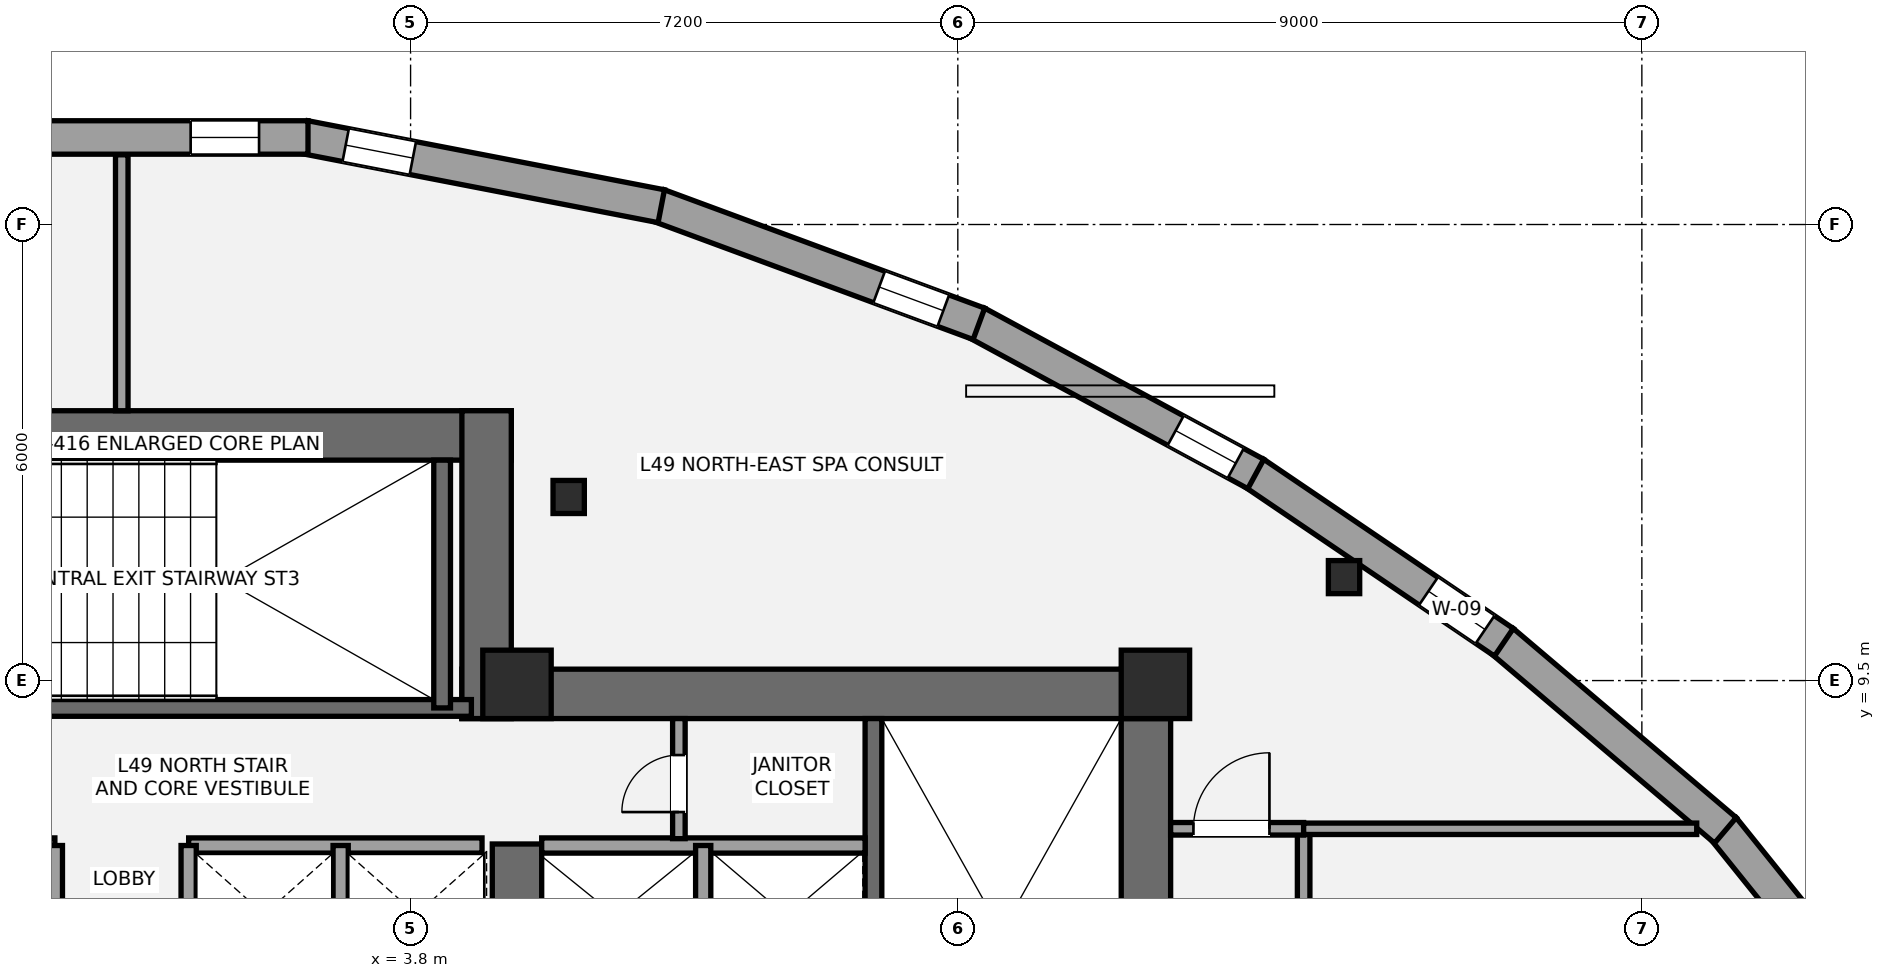
"""IFC4 building model, lengths in metres.
Left out: names, types, materials, properties, quantities, classifications, styles, units other than length and angle.
Written with IfcOpenShell. Run it as: python <this file> out.ifc"""

import sys

from ifc_helpers import new_model, si_unit, direction, frame, frame_2d, origin, origin_2d, place, context, subcontext, project, spatial, rectangle, i_section, extrude, element, fill, save


model = new_model("IFC4")
c1 = context("Model", 3, precision=1e-05, world=origin(), true_north=direction((0.0, 1.0)))
c2 = subcontext(c1, "Body", "Model", "MODEL_VIEW")
j1 = project(units=[si_unit("LENGTHUNIT", "METRE"), si_unit("PLANEANGLEUNIT", "RADIAN")], contexts=[c1])
p1 = place(None, origin())
s1 = spatial("IfcSite", under=j1, at=p1, CompositionType="ELEMENT")
p2 = place(p1, origin())
s2 = spatial("IfcBuilding", under=s1, at=p2, CompositionType="ELEMENT")
p3 = place(p2, frame((0.0, 0.0, 179.0)))
s3 = spatial("IfcBuildingStorey", under=s2, at=p3, CompositionType="ELEMENT", Elevation=179.0)
p4 = place(p3, frame((13.475, 1.2, 0.0), z_axis=(0.0, 0.0, 1.0), x_axis=(0.0, 1.0, 0.0)))
e1 = element("IfcWall", 1, at=p4, inside=s3, PredefinedType="SHEAR", context=c2, shape_type="SweptSolid", body=[
    extrude(rectangle(XDim=8.45, YDim=0.65, at=frame_2d((4.225, 0.0))), origin(), (0.0, 0.0, 1.0), 3.2),
])
p5 = place(p3, frame((4.475, 9.325, 0.0), z_axis=(0.0, 0.0, 1.0), x_axis=(1.0, 0.0, 0.0)))
e2 = element("IfcWall", 2, at=p5, inside=s3, PredefinedType="SHEAR", context=c2, shape_type="SweptSolid", body=[
    extrude(rectangle(XDim=9.325, YDim=0.65, at=frame_2d((4.663, 0.0))), origin(), (0.0, 0.0, 1.0), 3.2),
])
p6 = place(p3, frame((5.2, 5.35, 0.0), z_axis=(0.0, 0.0, 1.0), x_axis=(0.0, 1.0, 0.0)))
e3 = element("IfcWall", 3, at=p6, inside=s3, PredefinedType="SHEAR", context=c2, shape_type="SweptSolid", body=[
    extrude(rectangle(XDim=2.0, YDim=0.65, at=frame_2d((1.0, 0.0))), origin(), (0.0, 0.0, 1.0), 3.2),
])
p7 = place(p3, frame((9.89, 1.85, 0.0), z_axis=(0.0, 0.0, 1.0), x_axis=(0.0, 1.0, 0.0)))
e4 = element("IfcWall", 4, at=p7, inside=s3, PredefinedType="SHEAR", context=c2, shape_type="SweptSolid", body=[
    extrude(rectangle(XDim=7.15, YDim=0.22, at=frame_2d((3.575, 0.0))), origin(), (0.0, 0.0, 1.0), 3.2),
])
p8 = place(p3, frame((-5.125, 12.725, 0.0), z_axis=(0.0, 0.0, 1.0), x_axis=(1.0, 0.0, 0.0)))
e5 = element("IfcWall", 5, at=p8, inside=s3, PredefinedType="SHEAR", context=c2, shape_type="SweptSolid", body=[
    extrude(rectangle(XDim=10.25, YDim=0.65, at=frame_2d((5.125, 0.0))), origin(), (0.0, 0.0, 1.0), 3.2),
])
p9 = place(p3, frame((4.8, 9.0, 0.0), z_axis=(0.0, 0.0, 1.0), x_axis=(0.0, 1.0, 0.0)))
e6 = element("IfcWall", 6, at=p9, inside=s3, PredefinedType="SHEAR", context=c2, shape_type="SweptSolid", body=[
    extrude(rectangle(XDim=4.05, YDim=0.65, at=frame_2d((2.025, 0.0))), origin(), (0.0, 0.0, 1.0), 3.2),
])
p10 = place(p3, frame((-4.7, 9.14, 0.0), z_axis=(0.0, 0.0, 1.0), x_axis=(1.0, 0.0, 0.0)))
e7 = element("IfcWall", 7, at=p10, inside=s3, PredefinedType="SHEAR", context=c2, shape_type="SweptSolid", body=[
    extrude(rectangle(XDim=9.3, YDim=0.22, at=frame_2d((4.65, 0.0))), origin(), (0.0, 0.0, 1.0), 3.2),
])
p11 = place(p10, frame((1.15, 0.0, 0.0)))
e8 = element("IfcOpeningElement", 8, at=p11, cuts=e7, PredefinedType="OPENING", context=c2, shape_type="SweptSolid", body=[
    extrude(rectangle(XDim=1.05, YDim=2.15, at=frame_2d((0.525, 1.075))), frame((0.0, 0.12, 0.0), z_axis=(0.0, -1.0, 0.0), x_axis=(1.0, 0.0, 0.0)), (0.0, 0.0, 1.0), 0.24),
])
p12 = place(p3, frame((4.215, 9.14, 0.0), z_axis=(0.0, 0.0, 1.0), x_axis=(0.0, 1.0, 0.0)))
e9 = element("IfcWall", 9, at=p12, inside=s3, PredefinedType="SHEAR", context=c2, shape_type="SweptSolid", body=[
    extrude(rectangle(XDim=3.26, YDim=0.22, at=frame_2d((1.63, 0.0))), origin(), (0.0, 0.0, 1.0), 3.2),
])
for number, where, z_axis, x_axis in (
    (10, (5.2, 9.45, 0.0), (0.0, 0.0, 1.0), (1.0, 0.0, 0.0)),
    (11, (13.6, 9.45, 0.0), (0.0, 0.0, 1.0), (1.0, 0.0, 0.0)),
):
    element("IfcColumn", number, at=place(p3, frame(where, z_axis=z_axis, x_axis=x_axis)), inside=s3, PredefinedType="COLUMN", context=c2, shape_type="SweptSolid", body=[
        extrude(rectangle(XDim=0.9, YDim=0.9, at=origin_2d()), origin(), (0.0, 0.0, 1.0), 3.2),
    ])
for number, where, z_axis, x_axis in (
    (12, (16.082, 10.861, 0.0), (0.0, 0.0, 1.0), (1.0, 0.0, 0.0)),
    (13, (5.88, 11.915, 0.0), (0.0, 0.0, 1.0), (1.0, 0.0, 0.0)),
):
    element("IfcColumn", number, at=place(p3, frame(where, z_axis=z_axis, x_axis=x_axis)), inside=s3, PredefinedType="COLUMN", context=c2, shape_type="SweptSolid", body=[
        extrude(i_section(OverallWidth=0.412, OverallDepth=0.435, WebThickness=0.036, FlangeThickness=0.057, at=origin_2d()), origin(), (0.0, 0.0, 1.0), 3.2),
    ])
p13 = place(p3, frame((21.07, 7.559, 0.0), z_axis=(0.0, 0.0, 1.0), x_axis=(0.626642586146, -0.779306787618, 0.0)))
e14 = element("IfcWall", 14, at=p13, inside=s3, PredefinedType="STANDARD", context=c2, shape_type="SweptSolid", body=[
    extrude(rectangle(XDim=3.665, YDim=0.44, at=frame_2d((1.833, 0.0))), origin(), (0.0, 0.0, 1.0), 2.315),
])
p14 = place(p13, frame((2.565, 0.0, 0.42)))
e15 = element("IfcOpeningElement", 15, at=p14, cuts=e14, PredefinedType="OPENING", context=c2, shape_type="SweptSolid", body=[
    extrude(rectangle(XDim=0.9, YDim=1.35, at=frame_2d((0.45, 0.675))), frame((0.0, 0.23, 0.0), z_axis=(0.0, -1.0, 0.0), x_axis=(1.0, 0.0, 0.0)), (0.0, 0.0, 1.0), 0.46),
])
p15 = place(p3, frame((18.166, 10.018, 0.0), z_axis=(0.0, 0.0, 1.0), x_axis=(0.762499647343, -0.646988630349, 0.0)))
e16 = element("IfcWall", 16, at=p15, inside=s3, PredefinedType="STANDARD", context=c2, shape_type="SweptSolid", body=[
    extrude(rectangle(XDim=3.847, YDim=0.44, at=frame_2d((1.923, 0.0))), origin(), (0.0, 0.0, 1.0), 2.315),
])
p16 = place(p3, frame((14.902, 12.229, 0.0), z_axis=(0.0, 0.0, 1.0), x_axis=(0.827725942945, -0.561132572015, 0.0)))
e17 = element("IfcWall", 17, at=p16, inside=s3, PredefinedType="STANDARD", context=c2, shape_type="SweptSolid", body=[
    extrude(rectangle(XDim=3.966, YDim=0.44, at=frame_2d((1.983, 0.0))), origin(), (0.0, 0.0, 1.0), 2.315),
])
p17 = place(p16, frame((2.768, 0.0, 0.58)))
e18 = element("IfcOpeningElement", 18, at=p17, cuts=e17, PredefinedType="OPENING", context=c2, shape_type="SweptSolid", body=[
    extrude(rectangle(XDim=0.9, YDim=1.35, at=frame_2d((0.45, 0.675))), frame((0.0, 0.23, 0.0), z_axis=(0.0, -1.0, 0.0), x_axis=(1.0, 0.0, 0.0)), (0.0, 0.0, 1.0), 0.46),
])
p18 = place(p3, frame((11.249, 14.206, 0.0), z_axis=(0.0, 0.0, 1.0), x_axis=(0.879306250646, -0.476256776933, 0.0)))
e19 = element("IfcWall", 19, at=p18, inside=s3, PredefinedType="STANDARD", context=c2, shape_type="SweptSolid", body=[
    extrude(rectangle(XDim=4.175, YDim=0.44, at=frame_2d((2.088, 0.0))), origin(), (0.0, 0.0, 1.0), 2.315),
])
p19 = place(p18, frame((2.976, 0.0, 0.58)))
e20 = element("IfcOpeningElement", 20, at=p19, cuts=e19, PredefinedType="OPENING", context=c2, shape_type="SweptSolid", body=[
    extrude(rectangle(XDim=0.9, YDim=1.35, at=frame_2d((0.45, 0.675))), frame((0.0, 0.23, 0.0), z_axis=(0.0, -1.0, 0.0), x_axis=(1.0, 0.0, 0.0)), (0.0, 0.0, 1.0), 0.46),
])
p20 = place(p3, frame((7.064, 15.75, 0.0), z_axis=(0.0, 0.0, 1.0), x_axis=(0.937993730452, -0.346652220004, 0.0)))
e21 = element("IfcWall", 21, at=p20, inside=s3, PredefinedType="STANDARD", context=c2, shape_type="SweptSolid", body=[
    extrude(rectangle(XDim=4.492, YDim=0.44, at=frame_2d((2.246, 0.0))), origin(), (0.0, 0.0, 1.0), 2.315),
])
p21 = place(p20, frame((3.093, 0.0, 0.58)))
e22 = element("IfcOpeningElement", 22, at=p21, cuts=e21, PredefinedType="OPENING", context=c2, shape_type="SweptSolid", body=[
    extrude(rectangle(XDim=0.9, YDim=1.35, at=frame_2d((0.45, 0.675))), frame((0.0, 0.23, 0.0), z_axis=(0.0, -1.0, 0.0), x_axis=(1.0, 0.0, 0.0)), (0.0, 0.0, 1.0), 0.46),
])
p22 = place(p3, frame((2.408, 16.649, 0.0), z_axis=(0.0, 0.0, 1.0), x_axis=(0.981751851942, -0.190166509166, 0.0)))
e23 = element("IfcWall", 23, at=p22, inside=s3, PredefinedType="STANDARD", context=c2, shape_type="SweptSolid", body=[
    extrude(rectangle(XDim=4.777, YDim=0.44, at=frame_2d((2.389, 0.0))), origin(), (0.0, 0.0, 1.0), 2.315),
])
p23 = place(p22, frame((0.548, 0.0, 0.58)))
e24 = element("IfcOpeningElement", 24, at=p23, cuts=e23, PredefinedType="OPENING", context=c2, shape_type="SweptSolid", body=[
    extrude(rectangle(XDim=0.9, YDim=1.35, at=frame_2d((0.45, 0.675))), frame((0.0, 0.23, 0.0), z_axis=(0.0, -1.0, 0.0), x_axis=(1.0, 0.0, 0.0)), (0.0, 0.0, 1.0), 0.46),
])
p24 = place(p3, frame((-2.45, 16.645, 0.0), z_axis=(0.0, 0.0, 1.0), x_axis=(1.0, 0.0, 0.0)))
e25 = element("IfcWall", 25, at=p24, inside=s3, PredefinedType="STANDARD", context=c2, shape_type="SweptSolid", body=[
    extrude(rectangle(XDim=4.9, YDim=0.44, at=frame_2d((2.45, 0.0))), origin(), (0.0, 0.0, 1.0), 2.315),
])
p25 = place(p24, frame((3.357, 0.0, 0.58)))
e26 = element("IfcOpeningElement", 26, at=p25, cuts=e25, PredefinedType="OPENING", context=c2, shape_type="SweptSolid", body=[
    extrude(rectangle(XDim=0.9, YDim=1.35, at=frame_2d((0.45, 0.675))), frame((0.0, 0.23, 0.0), z_axis=(0.0, -1.0, 0.0), x_axis=(1.0, 0.0, 0.0)), (0.0, 0.0, 1.0), 0.46),
])
p26 = place(p3, frame((5.525, 7.33, 0.0), z_axis=(0.0, 0.0, 1.0), x_axis=(1.0, 0.0, 0.0)))
e27 = element("IfcWall", 27, at=p26, inside=s3, PredefinedType="SOLIDWALL", context=c2, shape_type="SweptSolid", body=[
    extrude(rectangle(XDim=4.255, YDim=0.2, at=frame_2d((2.127, 0.0))), origin(), (0.0, 0.0, 1.0), 3.02),
])
p27 = place(p3, frame((7.65, 5.47, 0.0), z_axis=(0.0, 0.0, 1.0), x_axis=(0.0, 1.0, 0.0)))
e28 = element("IfcWall", 28, at=p27, inside=s3, PredefinedType="SOLIDWALL", context=c2, shape_type="SweptSolid", body=[
    extrude(rectangle(XDim=1.86, YDim=0.2, at=frame_2d((0.93, 0.0))), origin(), (0.0, 0.0, 1.0), 3.02),
])
for number, where, z_axis, x_axis in (
    (29, (-4.74, 7.33, 0.0), (0.0, 0.0, 1.0), (1.0, 0.0, 0.0)),
    (30, (0.88, 7.33, 0.0), (0.0, 0.0, 1.0), (1.0, 0.0, 0.0)),
):
    element("IfcWall", number, at=place(p3, frame(where, z_axis=z_axis, x_axis=x_axis)), inside=s3, PredefinedType="SOLIDWALL", context=c2, shape_type="SweptSolid", body=[
        extrude(rectangle(XDim=3.86, YDim=0.2, at=frame_2d((1.93, 0.0))), origin(), (0.0, 0.0, 1.0), 3.02),
    ])
for number, where, z_axis, x_axis in (
    (31, (2.88, 5.52, 0.0), (0.0, 0.0, 1.0), (0.0, 1.0, 0.0)),
    (32, (-0.88, 5.52, 0.0), (0.0, 0.0, 1.0), (0.0, 1.0, 0.0)),
    (33, (0.88, 5.52, 0.0), (0.0, 0.0, 1.0), (0.0, 1.0, 0.0)),
):
    element("IfcWall", number, at=place(p3, frame(where, z_axis=z_axis, x_axis=x_axis)), inside=s3, PredefinedType="SOLIDWALL", context=c2, shape_type="SweptSolid", body=[
        extrude(rectangle(XDim=1.81, YDim=0.2, at=frame_2d((0.905, 0.0))), origin(), (0.0, 0.0, 1.0), 3.02),
    ])
p28 = place(p3, frame((7.33, 7.42, 0.0), z_axis=(0.0, 0.0, 1.0), x_axis=(0.0, 1.0, 0.0)))
e34 = element("IfcWall", 34, at=p28, inside=s3, PredefinedType="PARTITIONING", context=c2, shape_type="SweptSolid", body=[
    extrude(rectangle(XDim=1.58, YDim=0.165, at=frame_2d((0.79, 0.0))), origin(), (0.0, 0.0, 1.0), 3.02),
])
p29 = place(p28, frame((0.35, 0.0, 0.0)))
e35 = element("IfcOpeningElement", 35, at=p29, cuts=e34, PredefinedType="OPENING", context=c2, shape_type="SweptSolid", body=[
    extrude(rectangle(XDim=0.75, YDim=2.1, at=frame_2d((0.375, 1.05))), frame((0.0, 0.093, 0.0), z_axis=(0.0, -1.0, 0.0), x_axis=(1.0, 0.0, 0.0)), (0.0, 0.0, 1.0), 0.185),
])
p30 = place(p3, frame((15.55, -11.514, 0.0), z_axis=(0.0, 0.0, 1.0), x_axis=(0.0, 1.0, 0.0)))
e36 = element("IfcWall", 36, at=p30, inside=s3, PredefinedType="PARTITIONING", context=c2, shape_type="SweptSolid", body=[
    extrude(rectangle(XDim=19.064, YDim=0.165, at=frame_2d((9.532, 0.0))), origin(), (0.0, 0.0, 1.0), 2.473),
])
p31 = place(p30, frame((4.365, 0.0, 0.0)))
e37 = element("IfcOpeningElement", 37, at=p31, cuts=e36, PredefinedType="OPENING", context=c2, shape_type="SweptSolid", body=[
    extrude(rectangle(XDim=0.85, YDim=2.1, at=frame_2d((0.425, 1.05))), frame((0.0, 0.093, 0.0), z_axis=(0.0, -1.0, 0.0), x_axis=(1.0, 0.0, 0.0)), (0.0, 0.0, 1.0), 0.185),
])
p32 = place(p30, frame((7.515, 0.0, 0.0)))
e38 = element("IfcOpeningElement", 38, at=p32, cuts=e36, PredefinedType="OPENING", context=c2, shape_type="SweptSolid", body=[
    extrude(rectangle(XDim=1.0, YDim=2.15, at=frame_2d((0.5, 1.075))), frame((0.0, 0.093, 0.0), z_axis=(0.0, -1.0, 0.0), x_axis=(1.0, 0.0, 0.0)), (0.0, 0.0, 1.0), 0.185),
])
p33 = place(p30, frame((11.915, 0.0, 0.0)))
e39 = element("IfcOpeningElement", 39, at=p33, cuts=e36, PredefinedType="OPENING", context=c2, shape_type="SweptSolid", body=[
    extrude(rectangle(XDim=1.0, YDim=2.15, at=frame_2d((0.5, 1.075))), frame((0.0, 0.093, 0.0), z_axis=(0.0, -1.0, 0.0), x_axis=(1.0, 0.0, 0.0)), (0.0, 0.0, 1.0), 0.185),
])
p34 = place(p30, frame((16.29, 0.0, 0.0)))
e40 = element("IfcOpeningElement", 40, at=p34, cuts=e36, PredefinedType="OPENING", context=c2, shape_type="SweptSolid", body=[
    extrude(rectangle(XDim=1.0, YDim=2.15, at=frame_2d((0.5, 1.075))), frame((0.0, 0.093, 0.0), z_axis=(0.0, -1.0, 0.0), x_axis=(1.0, 0.0, 0.0)), (0.0, 0.0, 1.0), 0.185),
])
p35 = place(p3, frame((13.8, 7.55, 0.0), z_axis=(0.0, 0.0, 1.0), x_axis=(1.0, 0.0, 0.0)))
e41 = element("IfcWall", 41, at=p35, inside=s3, PredefinedType="PARTITIONING", context=c2, shape_type="SweptSolid", body=[
    extrude(rectangle(XDim=1.75, YDim=0.165, at=frame_2d((0.875, 0.0))), origin(), (0.0, 0.0, 1.0), 3.02),
])
p36 = place(p35, frame((0.3, 0.0, 0.0)))
e42 = element("IfcOpeningElement", 42, at=p36, cuts=e41, PredefinedType="OPENING", context=c2, shape_type="SweptSolid", body=[
    extrude(rectangle(XDim=1.0, YDim=2.15, at=frame_2d((0.5, 1.075))), frame((0.0, 0.093, 0.0), z_axis=(0.0, -1.0, 0.0), x_axis=(1.0, 0.0, 0.0)), (0.0, 0.0, 1.0), 0.185),
])
p37 = place(p3, frame((15.55, 7.55, 0.0), z_axis=(0.0, 0.0, 1.0), x_axis=(1.0, 0.0, 0.0)))
e43 = element("IfcWall", 43, at=p37, inside=s3, PredefinedType="PLUMBINGWALL", context=c2, shape_type="SweptSolid", body=[
    extrude(rectangle(XDim=5.172, YDim=0.15, at=frame_2d((2.586, 0.0))), origin(), (0.0, 0.0, 1.0), 2.473),
])
p38 = place(p3, frame((0.0, 13.05, 0.0), z_axis=(0.0, 0.0, 1.0), x_axis=(0.0, 1.0, 0.0)))
e44 = element("IfcWall", 44, at=p38, inside=s3, PredefinedType="PARTITIONING", context=c2, shape_type="SweptSolid", body=[
    extrude(rectangle(XDim=3.367, YDim=0.165, at=frame_2d((1.684, 0.0))), origin(), (0.0, 0.0, 1.0), 3.02),
])
p39 = place(p17, origin())
e45 = element("IfcWindow", 45, at=p39, inside=s3, PartitioningType="SINGLE_PANEL", PredefinedType="WINDOW", context=c2, shape_type="SweptSolid", body=[
    extrude(rectangle(XDim=0.9, YDim=1.35, at=frame_2d((0.45, 0.675))), frame((0.0, -0.01, 0.0), z_axis=(0.0, -1.0, 0.0), x_axis=(1.0, 0.0, 0.0)), (0.0, 0.0, 1.0), 0.06),
])
fill(e18, e45)
p40 = place(p19, origin())
e46 = element("IfcWindow", 46, at=p40, inside=s3, PartitioningType="SINGLE_PANEL", PredefinedType="WINDOW", context=c2, shape_type="SweptSolid", body=[
    extrude(rectangle(XDim=0.9, YDim=1.35, at=frame_2d((0.45, 0.675))), frame((0.0, -0.01, 0.0), z_axis=(0.0, -1.0, 0.0), x_axis=(1.0, 0.0, 0.0)), (0.0, 0.0, 1.0), 0.06),
])
fill(e20, e46)
p41 = place(p21, origin())
e47 = element("IfcWindow", 47, at=p41, inside=s3, PartitioningType="SINGLE_PANEL", PredefinedType="WINDOW", context=c2, shape_type="SweptSolid", body=[
    extrude(rectangle(XDim=0.9, YDim=1.35, at=frame_2d((0.45, 0.675))), frame((0.0, -0.01, 0.0), z_axis=(0.0, -1.0, 0.0), x_axis=(1.0, 0.0, 0.0)), (0.0, 0.0, 1.0), 0.06),
])
fill(e22, e47)
p42 = place(p23, origin())
e48 = element("IfcWindow", 48, at=p42, inside=s3, PartitioningType="SINGLE_PANEL", PredefinedType="WINDOW", context=c2, shape_type="SweptSolid", body=[
    extrude(rectangle(XDim=0.9, YDim=1.35, at=frame_2d((0.45, 0.675))), frame((0.0, -0.01, 0.0), z_axis=(0.0, -1.0, 0.0), x_axis=(1.0, 0.0, 0.0)), (0.0, 0.0, 1.0), 0.06),
])
fill(e24, e48)
p43 = place(p25, origin())
e49 = element("IfcWindow", 49, at=p43, inside=s3, PartitioningType="SINGLE_PANEL", PredefinedType="WINDOW", context=c2, shape_type="SweptSolid", body=[
    extrude(rectangle(XDim=0.9, YDim=1.35, at=frame_2d((0.45, 0.675))), frame((0.0, -0.01, 0.0), z_axis=(0.0, -1.0, 0.0), x_axis=(1.0, 0.0, 0.0)), (0.0, 0.0, 1.0), 0.06),
])
fill(e26, e49)
p44 = place(p29, origin())
e50 = element("IfcDoor", 50, at=p44, inside=s3, OperationType="SINGLE_SWING_LEFT", PredefinedType="DOOR", context=c2, shape_type="SweptSolid", body=[
    extrude(rectangle(XDim=0.75, YDim=2.1, at=frame_2d((0.375, 1.05))), frame((0.0, 0.025, 0.0), z_axis=(0.0, -1.0, 0.0), x_axis=(1.0, 0.0, 0.0)), (0.0, 0.0, 1.0), 0.05),
])
fill(e35, e50)
p45 = place(p36, origin())
e51 = element("IfcDoor", 51, at=p45, inside=s3, OperationType="SINGLE_SWING_RIGHT", PredefinedType="DOOR", context=c2, shape_type="SweptSolid", body=[
    extrude(rectangle(XDim=1.0, YDim=2.15, at=frame_2d((0.5, 1.075))), frame((0.0, 0.025, 0.0), z_axis=(0.0, -1.0, 0.0), x_axis=(1.0, 0.0, 0.0)), (0.0, 0.0, 1.0), 0.05),
])
fill(e42, e51)
save(model, sys.argv[1])
